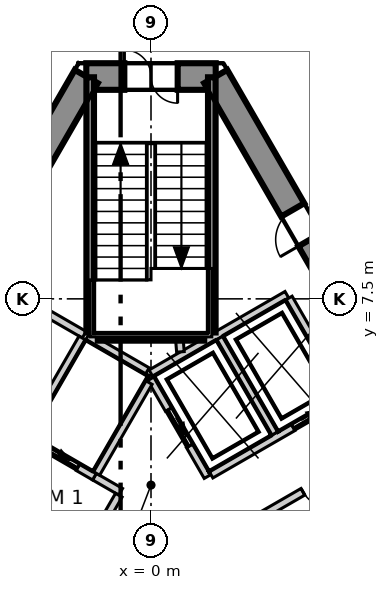
"""IFC4 building model, lengths in metres.
Left out: names, types, materials, properties, quantities, classifications, styles, units other than length and angle.
Written with IfcOpenShell. Run it as: python <this file> out.ifc"""

import sys

from ifc_helpers import new_model, si_unit, direction, frame, frame_2d, origin, place, context, subcontext, project, spatial, polyline, rectangle, outline, extrude, element, fill, save


model = new_model("IFC4")
c1 = context("Model", 3, precision=1e-05, world=origin(), true_north=direction((0.0, 1.0)))
c2 = subcontext(c1, "Body", "Model", "MODEL_VIEW")
j1 = project(units=[si_unit("LENGTHUNIT", "METRE"), si_unit("PLANEANGLEUNIT", "RADIAN")], contexts=[c1])
p1 = place(None, origin())
s1 = spatial("IfcSite", under=j1, at=p1, CompositionType="ELEMENT")
p2 = place(p1, origin())
s2 = spatial("IfcBuilding", under=s1, at=p2, CompositionType="ELEMENT")
p3 = place(p2, frame((0.0, 0.0, 215.3)))
s3 = spatial("IfcBuildingStorey", under=s2, at=p3, CompositionType="ELEMENT", Elevation=215.3)
p4 = place(p3, frame((1.703, 13.35, -0.3), z_axis=(0.0, 0.0, 1.0), x_axis=(-1.0, 0.0, 0.0)))
e1 = element("IfcWall", 1, at=p4, inside=s3, PredefinedType="SHEAR", context=c2, shape_type="SweptSolid", body=[
    extrude(outline(polyline([(-0.202, -0.35), (1.703, -0.35), (3.608, -0.35), (3.204, 0.35), (1.703, 0.35), (0.202, 0.35), (-0.202, -0.35)])), origin(), (0.0, 0.0, 1.0), 4.0),
])
p5 = place(p4, frame((1.003, 0.0, 0.3)))
e2 = element("IfcOpeningElement", 2, at=p5, cuts=e1, PredefinedType="OPENING", context=c2, shape_type="SweptSolid", body=[
    extrude(rectangle(XDim=1.4, YDim=2.1, at=frame_2d((0.7, 1.05))), frame((0.0, 0.36, 0.0), z_axis=(0.0, -1.0, 0.0), x_axis=(1.0, 0.0, 0.0)), (0.0, 0.0, 1.0), 0.72),
])
p6 = place(p3, frame((-1.703, 13.35, -0.3), z_axis=(0.0, 0.0, 1.0), x_axis=(-0.500011533395, -0.866018744874, 0.0)))
e3 = element("IfcWall", 3, at=p6, inside=s3, PredefinedType="SHEAR", context=c2, shape_type="SweptSolid", body=[
    extrude(outline(polyline([(-0.202, -0.35), (1.782, -0.35), (3.766, -0.35), (5.75, -0.35), (7.734, -0.35), (9.718, -0.35), (11.702, -0.35), (13.686, -0.35), (15.67, -0.35), (17.654, -0.35), (19.638, -0.35), (21.622, -0.35), (21.218, 0.35), (19.307, 0.35), (17.397, 0.35), (15.486, 0.35), (13.576, 0.35), (11.665, 0.35), (9.755, 0.35), (7.844, 0.35), (5.934, 0.35), (4.023, 0.35), (2.113, 0.35), (0.202, 0.35), (-0.202, -0.35)])), origin(), (0.0, 0.0, 1.0), 4.0),
])
p7 = place(p6, frame((10.16, 0.0, 0.3)))
e4 = element("IfcOpeningElement", 4, at=p7, cuts=e3, PredefinedType="OPENING", context=c2, shape_type="SweptSolid", body=[
    extrude(rectangle(XDim=1.1, YDim=2.1, at=frame_2d((0.55, 1.05))), frame((0.0, 0.36, 0.0), z_axis=(0.0, -1.0, 0.0), x_axis=(1.0, 0.0, 0.0)), (0.0, 0.0, 1.0), 0.72),
])
p8 = place(p6, frame((16.465, 0.0, 0.3)))
e5 = element("IfcOpeningElement", 5, at=p8, cuts=e3, PredefinedType="OPENING", context=c2, shape_type="SweptSolid", body=[
    extrude(rectangle(XDim=0.9, YDim=2.1, at=frame_2d((0.45, 1.05))), frame((0.0, 0.36, 0.0), z_axis=(0.0, -1.0, 0.0), x_axis=(1.0, 0.0, 0.0)), (0.0, 0.0, 1.0), 0.72),
])
p9 = place(p6, frame((4.005, 0.0, 0.3)))
e6 = element("IfcOpeningElement", 6, at=p9, cuts=e3, PredefinedType="OPENING", context=c2, shape_type="SweptSolid", body=[
    extrude(rectangle(XDim=1.0, YDim=2.1, at=frame_2d((0.5, 1.05))), frame((0.0, 0.36, 0.0), z_axis=(0.0, -1.0, 0.0), x_axis=(1.0, 0.0, 0.0)), (0.0, 0.0, 1.0), 0.72),
])
p10 = place(p3, frame((12.413, -5.2, -0.3), z_axis=(0.0, 0.0, 1.0), x_axis=(-0.500011533395, 0.866018744874, 0.0)))
e7 = element("IfcWall", 7, at=p10, inside=s3, PredefinedType="SHEAR", context=c2, shape_type="SweptSolid", body=[
    extrude(outline(polyline([(-0.202, -0.35), (1.782, -0.35), (3.766, -0.35), (5.75, -0.35), (7.734, -0.35), (9.718, -0.35), (11.702, -0.35), (13.686, -0.35), (15.67, -0.35), (17.654, -0.35), (19.638, -0.35), (21.622, -0.35), (21.218, 0.35), (19.307, 0.35), (17.397, 0.35), (15.486, 0.35), (13.576, 0.35), (11.665, 0.35), (9.755, 0.35), (7.844, 0.35), (5.934, 0.35), (4.023, 0.35), (2.113, 0.35), (0.202, 0.35), (-0.202, -0.35)])), origin(), (0.0, 0.0, 1.0), 4.0),
])
p11 = place(p10, frame((4.055, 0.0, 0.3)))
e8 = element("IfcOpeningElement", 8, at=p11, cuts=e7, PredefinedType="OPENING", context=c2, shape_type="SweptSolid", body=[
    extrude(rectangle(XDim=0.9, YDim=2.1, at=frame_2d((0.45, 1.05))), frame((0.0, 0.36, 0.0), z_axis=(0.0, -1.0, 0.0), x_axis=(1.0, 0.0, 0.0)), (0.0, 0.0, 1.0), 0.72),
])
p12 = place(p10, frame((16.465, 0.0, 0.3)))
e9 = element("IfcOpeningElement", 9, at=p12, cuts=e7, PredefinedType="OPENING", context=c2, shape_type="SweptSolid", body=[
    extrude(rectangle(XDim=0.9, YDim=2.1, at=frame_2d((0.45, 1.05))), frame((0.0, 0.36, 0.0), z_axis=(0.0, -1.0, 0.0), x_axis=(1.0, 0.0, 0.0)), (0.0, 0.0, 1.0), 0.72),
])
p13 = place(p3, frame((28.243, -13.098, 0.0), z_axis=(0.0, 0.0, 1.0), x_axis=(-0.500001688958, 0.866024428662, 0.0)))
e10 = element("IfcWall", 10, at=p13, inside=s3, PredefinedType="ELEMENTEDWALL", context=c2, shape_type="SweptSolid", body=[
    extrude(rectangle(XDim=50.909, YDim=0.2, at=frame_2d((25.455, 0.0))), origin(), (0.0, 0.0, 1.0), 3.7),
])
p14 = place(p13, frame((2.223, 0.0, 0.9)))
e11 = element("IfcOpeningElement", 11, at=p14, cuts=e10, PredefinedType="OPENING", context=c2, shape_type="SweptSolid", body=[
    extrude(rectangle(XDim=4.2, YDim=2.5, at=frame_2d((2.1, 1.25))), frame((0.0, 0.11, 0.0), z_axis=(0.0, -1.0, 0.0), x_axis=(1.0, 0.0, 0.0)), (0.0, 0.0, 1.0), 0.22),
])
p15 = place(p13, frame((8.263, 0.0, 0.9)))
e12 = element("IfcOpeningElement", 12, at=p15, cuts=e10, PredefinedType="OPENING", context=c2, shape_type="SweptSolid", body=[
    extrude(rectangle(XDim=4.2, YDim=2.5, at=frame_2d((2.1, 1.25))), frame((0.0, 0.11, 0.0), z_axis=(0.0, -1.0, 0.0), x_axis=(1.0, 0.0, 0.0)), (0.0, 0.0, 1.0), 0.22),
])
p16 = place(p13, frame((14.304, 0.0, 0.9)))
e13 = element("IfcOpeningElement", 13, at=p16, cuts=e10, PredefinedType="OPENING", context=c2, shape_type="SweptSolid", body=[
    extrude(rectangle(XDim=4.2, YDim=2.5, at=frame_2d((2.1, 1.25))), frame((0.0, 0.11, 0.0), z_axis=(0.0, -1.0, 0.0), x_axis=(1.0, 0.0, 0.0)), (0.0, 0.0, 1.0), 0.22),
])
p17 = place(p13, frame((20.345, 0.0, 0.9)))
e14 = element("IfcOpeningElement", 14, at=p17, cuts=e10, PredefinedType="OPENING", context=c2, shape_type="SweptSolid", body=[
    extrude(rectangle(XDim=4.2, YDim=2.5, at=frame_2d((2.1, 1.25))), frame((0.0, 0.11, 0.0), z_axis=(0.0, -1.0, 0.0), x_axis=(1.0, 0.0, 0.0)), (0.0, 0.0, 1.0), 0.22),
])
p18 = place(p13, frame((26.385, 0.0, 0.9)))
e15 = element("IfcOpeningElement", 15, at=p18, cuts=e10, PredefinedType="OPENING", context=c2, shape_type="SweptSolid", body=[
    extrude(rectangle(XDim=4.2, YDim=2.5, at=frame_2d((2.1, 1.25))), frame((0.0, 0.11, 0.0), z_axis=(0.0, -1.0, 0.0), x_axis=(1.0, 0.0, 0.0)), (0.0, 0.0, 1.0), 0.22),
])
p19 = place(p13, frame((32.426, 0.0, 0.9)))
e16 = element("IfcOpeningElement", 16, at=p19, cuts=e10, PredefinedType="OPENING", context=c2, shape_type="SweptSolid", body=[
    extrude(rectangle(XDim=4.2, YDim=2.5, at=frame_2d((2.1, 1.25))), frame((0.0, 0.11, 0.0), z_axis=(0.0, -1.0, 0.0), x_axis=(1.0, 0.0, 0.0)), (0.0, 0.0, 1.0), 0.22),
])
p20 = place(p13, frame((38.466, 0.0, 0.9)))
e17 = element("IfcOpeningElement", 17, at=p20, cuts=e10, PredefinedType="OPENING", context=c2, shape_type="SweptSolid", body=[
    extrude(rectangle(XDim=4.2, YDim=2.5, at=frame_2d((2.1, 1.25))), frame((0.0, 0.11, 0.0), z_axis=(0.0, -1.0, 0.0), x_axis=(1.0, 0.0, 0.0)), (0.0, 0.0, 1.0), 0.22),
])
p21 = place(p13, frame((44.507, 0.0, 0.9)))
e18 = element("IfcOpeningElement", 18, at=p21, cuts=e10, PredefinedType="OPENING", context=c2, shape_type="SweptSolid", body=[
    extrude(rectangle(XDim=4.2, YDim=2.5, at=frame_2d((2.1, 1.25))), frame((0.0, 0.11, 0.0), z_axis=(0.0, -1.0, 0.0), x_axis=(1.0, 0.0, 0.0)), (0.0, 0.0, 1.0), 0.22),
])
p22 = place(p3, frame((-20.883, -11.97, 0.0), z_axis=(0.0, 0.0, 1.0), x_axis=(0.500006150555, 0.866021852731, 0.0)))
e19 = element("IfcWall", 19, at=p22, inside=s3, PredefinedType="PARTITIONING", context=c2, shape_type="SweptSolid", body=[
    extrude(rectangle(XDim=41.766, YDim=0.15, at=frame_2d((20.883, 0.0))), origin(), (0.0, 0.0, 1.0), 3.7),
])
p23 = place(p22, frame((36.816, 0.0, 0.0)))
e20 = element("IfcOpeningElement", 20, at=p23, cuts=e19, PredefinedType="OPENING", context=c2, shape_type="SweptSolid", body=[
    extrude(rectangle(XDim=1.1, YDim=2.1, at=frame_2d((0.55, 1.05))), frame((0.0, 0.085, 0.0), z_axis=(0.0, -1.0, 0.0), x_axis=(1.0, 0.0, 0.0)), (0.0, 0.0, 1.0), 0.17),
])
p24 = place(p22, frame((23.939, 0.0, 0.0)))
e21 = element("IfcOpeningElement", 21, at=p24, cuts=e19, PredefinedType="OPENING", context=c2, shape_type="SweptSolid", body=[
    extrude(rectangle(XDim=1.1, YDim=2.1, at=frame_2d((0.55, 1.05))), frame((0.0, 0.085, 0.0), z_axis=(0.0, -1.0, 0.0), x_axis=(1.0, 0.0, 0.0)), (0.0, 0.0, 1.0), 0.17),
])
p25 = place(p22, frame((31.139, 0.0, 0.0)))
e22 = element("IfcOpeningElement", 22, at=p25, cuts=e19, PredefinedType="OPENING", context=c2, shape_type="SweptSolid", body=[
    extrude(rectangle(XDim=0.9, YDim=2.1, at=frame_2d((0.45, 1.05))), frame((0.0, 0.085, 0.0), z_axis=(0.0, -1.0, 0.0), x_axis=(1.0, 0.0, 0.0)), (0.0, 0.0, 1.0), 0.17),
])
p26 = place(p22, frame((28.739, 0.0, 0.0)))
e23 = element("IfcOpeningElement", 23, at=p26, cuts=e19, PredefinedType="OPENING", context=c2, shape_type="SweptSolid", body=[
    extrude(rectangle(XDim=0.9, YDim=2.1, at=frame_2d((0.45, 1.05))), frame((0.0, 0.085, 0.0), z_axis=(0.0, -1.0, 0.0), x_axis=(1.0, 0.0, 0.0)), (0.0, 0.0, 1.0), 0.17),
])
p27 = place(p22, frame((14.258, 0.0, 0.0)))
e24 = element("IfcOpeningElement", 24, at=p27, cuts=e19, PredefinedType="OPENING", context=c2, shape_type="SweptSolid", body=[
    extrude(rectangle(XDim=1.1, YDim=2.1, at=frame_2d((0.55, 1.05))), frame((0.0, 0.085, 0.0), z_axis=(0.0, -1.0, 0.0), x_axis=(1.0, 0.0, 0.0)), (0.0, 0.0, 1.0), 0.17),
])
p28 = place(p22, frame((3.777, 0.0, 0.0)))
e25 = element("IfcOpeningElement", 25, at=p28, cuts=e19, PredefinedType="OPENING", context=c2, shape_type="SweptSolid", body=[
    extrude(rectangle(XDim=1.1, YDim=2.1, at=frame_2d((0.55, 1.05))), frame((0.0, 0.085, 0.0), z_axis=(0.0, -1.0, 0.0), x_axis=(1.0, 0.0, 0.0)), (0.0, 0.0, 1.0), 0.17),
])
p29 = place(p3, frame((0.075, 24.07, 0.0), z_axis=(0.0, 0.0, 1.0), x_axis=(0.500006834213, -0.866021458014, 0.0)))
e26 = element("IfcWall", 26, at=p29, inside=s3, PredefinedType="PARTITIONING", context=c2, shape_type="SweptSolid", body=[
    extrude(rectangle(XDim=41.616, YDim=0.15, at=frame_2d((20.808, 0.0))), origin(), (0.0, 0.0, 1.0), 3.7),
])
p30 = place(p29, frame((33.715, 0.0, 0.0)))
e27 = element("IfcOpeningElement", 27, at=p30, cuts=e26, PredefinedType="OPENING", context=c2, shape_type="SweptSolid", body=[
    extrude(rectangle(XDim=1.1, YDim=2.1, at=frame_2d((0.55, 1.05))), frame((0.0, 0.085, 0.0), z_axis=(0.0, -1.0, 0.0), x_axis=(1.0, 0.0, 0.0)), (0.0, 0.0, 1.0), 0.17),
])
p31 = place(p29, frame((22.098, 0.0, 0.0)))
e28 = element("IfcOpeningElement", 28, at=p31, cuts=e26, PredefinedType="OPENING", context=c2, shape_type="SweptSolid", body=[
    extrude(rectangle(XDim=1.0, YDim=2.1, at=frame_2d((0.5, 1.05))), frame((0.0, 0.085, 0.0), z_axis=(0.0, -1.0, 0.0), x_axis=(1.0, 0.0, 0.0)), (0.0, 0.0, 1.0), 0.17),
])
p32 = place(p29, frame((25.198, 0.0, 0.0)))
e29 = element("IfcOpeningElement", 29, at=p32, cuts=e26, PredefinedType="OPENING", context=c2, shape_type="SweptSolid", body=[
    extrude(rectangle(XDim=0.9, YDim=2.1, at=frame_2d((0.45, 1.05))), frame((0.0, 0.085, 0.0), z_axis=(0.0, -1.0, 0.0), x_axis=(1.0, 0.0, 0.0)), (0.0, 0.0, 1.0), 0.17),
])
p33 = place(p29, frame((9.858, 0.0, 0.0)))
e30 = element("IfcOpeningElement", 30, at=p33, cuts=e26, PredefinedType="OPENING", context=c2, shape_type="SweptSolid", body=[
    extrude(rectangle(XDim=1.1, YDim=2.1, at=frame_2d((0.55, 1.05))), frame((0.0, 0.085, 0.0), z_axis=(0.0, -1.0, 0.0), x_axis=(1.0, 0.0, 0.0)), (0.0, 0.0, 1.0), 0.17),
])
p34 = place(p29, frame((18.758, 0.0, 0.0)))
e31 = element("IfcOpeningElement", 31, at=p34, cuts=e26, PredefinedType="OPENING", context=c2, shape_type="SweptSolid", body=[
    extrude(rectangle(XDim=0.9, YDim=2.1, at=frame_2d((0.45, 1.05))), frame((0.0, 0.085, 0.0), z_axis=(0.0, -1.0, 0.0), x_axis=(1.0, 0.0, 0.0)), (0.0, 0.0, 1.0), 0.17),
])
p35 = place(p29, frame((15.558, 0.0, 0.0)))
e32 = element("IfcOpeningElement", 32, at=p35, cuts=e26, PredefinedType="OPENING", context=c2, shape_type="SweptSolid", body=[
    extrude(rectangle(XDim=0.9, YDim=2.1, at=frame_2d((0.45, 1.05))), frame((0.0, 0.085, 0.0), z_axis=(0.0, -1.0, 0.0), x_axis=(1.0, 0.0, 0.0)), (0.0, 0.0, 1.0), 0.17),
])
p36 = place(p29, frame((12.658, 0.0, 0.0)))
e33 = element("IfcOpeningElement", 33, at=p36, cuts=e26, PredefinedType="OPENING", context=c2, shape_type="SweptSolid", body=[
    extrude(rectangle(XDim=1.0, YDim=2.1, at=frame_2d((0.5, 1.05))), frame((0.0, 0.085, 0.0), z_axis=(0.0, -1.0, 0.0), x_axis=(1.0, 0.0, 0.0)), (0.0, 0.0, 1.0), 0.17),
])
p37 = place(p29, frame((3.776, 0.0, 0.0)))
e34 = element("IfcOpeningElement", 34, at=p37, cuts=e26, PredefinedType="OPENING", context=c2, shape_type="SweptSolid", body=[
    extrude(rectangle(XDim=1.1, YDim=2.1, at=frame_2d((0.55, 1.05))), frame((0.0, 0.085, 0.0), z_axis=(0.0, -1.0, 0.0), x_axis=(1.0, 0.0, 0.0)), (0.0, 0.0, 1.0), 0.17),
])
p38 = place(p3, frame((-0.002, 5.541, 0.0), z_axis=(0.0, 0.0, 1.0), x_axis=(0.86600155993, 0.500041296494, 0.0)))
e35 = element("IfcWall", 35, at=p38, inside=s3, PredefinedType="SOLIDWALL", context=c2, shape_type="SweptSolid", body=[
    extrude(rectangle(XDim=4.132, YDim=0.2, at=frame_2d((2.066, 0.0))), origin(), (0.0, 0.0, 1.0), 3.7),
])
p39 = place(p3, frame((0.0, 5.4, 0.0), z_axis=(0.0, 0.0, 1.0), x_axis=(0.500103862429, -0.865965430478, 0.0)))
e36 = element("IfcWall", 36, at=p39, inside=s3, PredefinedType="SOLIDWALL", context=c2, shape_type="SweptSolid", body=[
    extrude(rectangle(XDim=2.973, YDim=0.2, at=frame_2d((1.487, 0.0))), origin(), (0.0, 0.0, 1.0), 3.7),
])
p40 = place(p39, frame((0.937, 0.0, 0.0)))
e37 = element("IfcOpeningElement", 37, at=p40, cuts=e36, PredefinedType="OPENING", context=c2, shape_type="SweptSolid", body=[
    extrude(rectangle(XDim=1.1, YDim=2.1, at=frame_2d((0.55, 1.05))), frame((0.0, 0.11, 0.0), z_axis=(0.0, -1.0, 0.0), x_axis=(1.0, 0.0, 0.0)), (0.0, 0.0, 1.0), 0.22),
])
p41 = place(p3, frame((1.578, 2.874, 0.0), z_axis=(0.0, 0.0, 1.0), x_axis=(0.866045911672, 0.499964477614, 0.0)))
e38 = element("IfcWall", 38, at=p41, inside=s3, PredefinedType="SOLIDWALL", context=c2, shape_type="SweptSolid", body=[
    extrude(rectangle(XDim=5.327, YDim=0.2, at=frame_2d((2.663, 0.0))), origin(), (0.0, 0.0, 1.0), 3.7),
])
p42 = place(p41, frame((2.496, 0.0, 0.0)))
e39 = element("IfcOpeningElement", 39, at=p42, cuts=e38, PredefinedType="OPENING", context=c2, shape_type="SweptSolid", body=[
    extrude(rectangle(XDim=1.1, YDim=2.1, at=frame_2d((0.55, 1.05))), frame((0.0, 0.11, 0.0), z_axis=(0.0, -1.0, 0.0), x_axis=(1.0, 0.0, 0.0)), (0.0, 0.0, 1.0), 0.22),
])
for number, where, z_axis, x_axis in (
    (40, (3.626, 7.52, 0.0), (0.0, 0.0, 1.0), (0.5, -0.866, 0.0)),
    (41, (1.807, 6.47, 0.0), (0.0, 0.0, 1.0), (0.5, -0.866, 0.0)),
):
    element("IfcWall", number, at=place(p3, frame(where, z_axis=z_axis, x_axis=x_axis)), inside=s3, PredefinedType="SOLIDWALL", context=c2, shape_type="SweptSolid", body=[
        extrude(rectangle(XDim=2.9, YDim=0.2, at=frame_2d((1.45, 0.0))), origin(), (0.0, 0.0, 1.0), 3.7),
    ])
p43 = place(p3, frame((2.548, 1.587, 0.0), z_axis=(0.0, 0.0, 1.0), x_axis=(0.866004344652, 0.500036473714, 0.0)))
e42 = element("IfcWall", 42, at=p43, inside=s3, PredefinedType="SOLIDWALL", context=c2, shape_type="SweptSolid", body=[
    extrude(rectangle(XDim=4.15, YDim=0.2, at=frame_2d((2.075, 0.0))), origin(), (0.0, 0.0, 1.0), 3.7),
])
p44 = place(p43, frame((1.675, 0.0, 0.0)))
e43 = element("IfcOpeningElement", 43, at=p44, cuts=e42, PredefinedType="OPENING", context=c2, shape_type="SweptSolid", body=[
    extrude(rectangle(XDim=0.9, YDim=2.1, at=frame_2d((0.45, 1.05))), frame((0.0, 0.11, 0.0), z_axis=(0.0, -1.0, 0.0), x_axis=(1.0, 0.0, 0.0)), (0.0, 0.0, 1.0), 0.22),
])
p45 = place(p3, frame((-1.488, 2.822, 0.0), z_axis=(0.0, 0.0, 1.0), x_axis=(0.866236612152, -0.499633997809, 0.0)))
e44 = element("IfcWall", 44, at=p45, inside=s3, PredefinedType="SOLIDWALL", context=c2, shape_type="SweptSolid", body=[
    extrude(rectangle(XDim=0.796, YDim=0.2, at=frame_2d((0.398, 0.0))), origin(), (0.0, 0.0, 1.0), 3.7),
])
p46 = place(p3, frame((-3.489, 7.557, 0.0), z_axis=(0.0, 0.0, 1.0), x_axis=(0.866010750942, -0.50002537861, 0.0)))
e45 = element("IfcWall", 45, at=p46, inside=s3, PredefinedType="SOLIDWALL", context=c2, shape_type="SweptSolid", body=[
    extrude(rectangle(XDim=2.0, YDim=0.2, at=frame_2d((1.0, 0.0))), origin(), (0.0, 0.0, 1.0), 3.7),
])
p47 = place(p3, frame((-2.444, -0.433, 0.0), z_axis=(0.0, 0.0, 1.0), x_axis=(0.500035624827, 0.866004834804, 0.0)))
e46 = element("IfcWall", 46, at=p47, inside=s3, PredefinedType="SOLIDWALL", context=c2, shape_type="SweptSolid", body=[
    extrude(rectangle(XDim=3.194, YDim=0.2, at=frame_2d((1.597, 0.0))), origin(), (0.0, 0.0, 1.0), 3.7),
])
p48 = place(p3, frame((-3.309, 3.873, 0.0), z_axis=(0.0, 0.0, 1.0), x_axis=(0.866098583652, -0.499873227325, 0.0)))
e47 = element("IfcWall", 47, at=p48, inside=s3, PredefinedType="SOLIDWALL", context=c2, shape_type="SweptSolid", body=[
    extrude(rectangle(XDim=2.103, YDim=0.2, at=frame_2d((1.051, 0.0))), origin(), (0.0, 0.0, 1.0), 3.7),
])
p49 = place(p48, frame((0.502, 0.0, 0.0)))
e48 = element("IfcOpeningElement", 48, at=p49, cuts=e47, PredefinedType="OPENING", context=c2, shape_type="SweptSolid", body=[
    extrude(rectangle(XDim=1.1, YDim=2.1, at=frame_2d((0.55, 1.05))), frame((0.0, 0.11, 0.0), z_axis=(0.0, -1.0, 0.0), x_axis=(1.0, 0.0, 0.0)), (0.0, 0.0, 1.0), 0.22),
])
p50 = place(p3, frame((-3.257, 3.959, 0.0), z_axis=(0.0, 0.0, 1.0), x_axis=(0.50012328804, 0.865954211699, 0.0)))
e49 = element("IfcWall", 49, at=p50, inside=s3, PredefinedType="SOLIDWALL", context=c2, shape_type="SweptSolid", body=[
    extrude(rectangle(XDim=2.9, YDim=0.2, at=frame_2d((1.45, 0.0))), origin(), (0.0, 0.0, 1.0), 3.7),
])
p51 = place(p3, frame((-1.67, 6.507, 0.0), z_axis=(0.0, 0.0, 1.0), x_axis=(0.865941441609, -0.500145398563, 0.0)))
e50 = element("IfcWall", 50, at=p51, inside=s3, PredefinedType="SOLIDWALL", context=c2, shape_type="SweptSolid", body=[
    extrude(rectangle(XDim=1.815, YDim=0.2, at=frame_2d((0.908, 0.0))), origin(), (0.0, 0.0, 1.0), 3.7),
])
p52 = place(p3, frame((-1.438, 2.909, 0.0), z_axis=(0.0, 0.0, 1.0), x_axis=(0.499829630636, 0.866123744241, 0.0)))
e51 = element("IfcWall", 51, at=p52, inside=s3, PredefinedType="SOLIDWALL", context=c2, shape_type="SweptSolid", body=[
    extrude(rectangle(XDim=2.761, YDim=0.2, at=frame_2d((1.38, 0.0))), origin(), (0.0, 0.0, 1.0), 3.7),
])
p53 = place(p3, frame((0.75, 6.4, 0.0), z_axis=(0.0, 0.0, 1.0), x_axis=(0.080860177601, -0.996725454515, 0.0)))
e52 = element("IfcWall", 52, at=p53, inside=s3, PredefinedType="SOLIDWALL", context=c2, shape_type="SweptSolid", body=[
    extrude(rectangle(XDim=0.296, YDim=0.2, at=frame_2d((0.148, 0.0))), origin(), (0.0, 0.0, 1.0), 3.7),
])
p54 = place(p3, frame((1.6, 6.615, 0.0), z_axis=(0.0, 0.0, 1.0), x_axis=(0.0, 1.0, 0.0)))
e53 = element("IfcWall", 53, at=p54, inside=s3, PredefinedType="SOLIDWALL", context=c2, shape_type="SweptSolid", body=[
    extrude(rectangle(XDim=6.715, YDim=0.2, at=frame_2d((3.357, 0.0))), origin(), (0.0, 0.0, 1.0), 3.7),
])
p55 = place(p3, frame((-1.4, 6.5, 0.0), z_axis=(0.0, 0.0, 1.0), x_axis=(1.0, 0.0, 0.0)))
e54 = element("IfcWall", 54, at=p55, inside=s3, PredefinedType="SOLIDWALL", context=c2, shape_type="SweptSolid", body=[
    extrude(rectangle(XDim=2.8, YDim=0.2, at=frame_2d((1.4, 0.0))), origin(), (0.0, 0.0, 1.0), 3.7),
])
p56 = place(p3, frame((-1.6, 6.615, 0.0), z_axis=(0.0, 0.0, 1.0), x_axis=(0.0, 1.0, 0.0)))
e55 = element("IfcWall", 55, at=p56, inside=s3, PredefinedType="SOLIDWALL", context=c2, shape_type="SweptSolid", body=[
    extrude(rectangle(XDim=6.715, YDim=0.2, at=frame_2d((3.357, 0.0))), origin(), (0.0, 0.0, 1.0), 3.7),
])
p57 = place(p40, origin())
e56 = element("IfcDoor", 56, at=p57, inside=s3, OperationType="SLIDING_TO_LEFT", PredefinedType="DOOR", context=c2, shape_type="SweptSolid", body=[
    extrude(rectangle(XDim=1.1, YDim=2.1, at=frame_2d((0.55, 1.05))), frame((0.0, 0.025, 0.0), z_axis=(0.0, -1.0, 0.0), x_axis=(1.0, 0.0, 0.0)), (0.0, 0.0, 1.0), 0.05),
])
fill(e37, e56)
p58 = place(p42, origin())
e57 = element("IfcDoor", 57, at=p58, inside=s3, OperationType="SLIDING_TO_LEFT", PredefinedType="DOOR", context=c2, shape_type="SweptSolid", body=[
    extrude(rectangle(XDim=1.1, YDim=2.1, at=frame_2d((0.55, 1.05))), frame((0.0, 0.025, 0.0), z_axis=(0.0, -1.0, 0.0), x_axis=(1.0, 0.0, 0.0)), (0.0, 0.0, 1.0), 0.05),
])
fill(e39, e57)
p59 = place(p49, origin())
e58 = element("IfcDoor", 58, at=p59, inside=s3, OperationType="SLIDING_TO_LEFT", PredefinedType="DOOR", context=c2, shape_type="SweptSolid", body=[
    extrude(rectangle(XDim=1.1, YDim=2.1, at=frame_2d((0.55, 1.05))), frame((0.0, 0.025, 0.0), z_axis=(0.0, -1.0, 0.0), x_axis=(1.0, 0.0, 0.0)), (0.0, 0.0, 1.0), 0.05),
])
fill(e48, e58)
p60 = place(p5, origin())
e59 = element("IfcDoor", 59, at=p60, inside=s3, OperationType="DOUBLE_DOOR_SINGLE_SWING", PredefinedType="DOOR", context=c2, shape_type="SweptSolid", body=[
    extrude(rectangle(XDim=1.4, YDim=2.1, at=frame_2d((0.7, 1.05))), frame((0.0, 0.025, 0.0), z_axis=(0.0, -1.0, 0.0), x_axis=(1.0, 0.0, 0.0)), (0.0, 0.0, 1.0), 0.05),
])
fill(e2, e59)
p61 = place(p12, origin())
e60 = element("IfcDoor", 60, at=p61, inside=s3, OperationType="SINGLE_SWING_RIGHT", PredefinedType="DOOR", context=c2, shape_type="SweptSolid", body=[
    extrude(rectangle(XDim=0.9, YDim=2.1, at=frame_2d((0.45, 1.05))), frame((0.0, 0.025, 0.0), z_axis=(0.0, -1.0, 0.0), x_axis=(1.0, 0.0, 0.0)), (0.0, 0.0, 1.0), 0.05),
])
fill(e9, e60)
p62 = place(p44, origin())
e61 = element("IfcDoor", 61, at=p62, inside=s3, OperationType="SINGLE_SWING_RIGHT", PredefinedType="DOOR", context=c2, shape_type="SweptSolid", body=[
    extrude(rectangle(XDim=0.9, YDim=2.1, at=frame_2d((0.45, 1.05))), frame((0.0, 0.025, 0.0), z_axis=(0.0, -1.0, 0.0), x_axis=(1.0, 0.0, 0.0)), (0.0, 0.0, 1.0), 0.05),
])
fill(e43, e61)
save(model, sys.argv[1])
